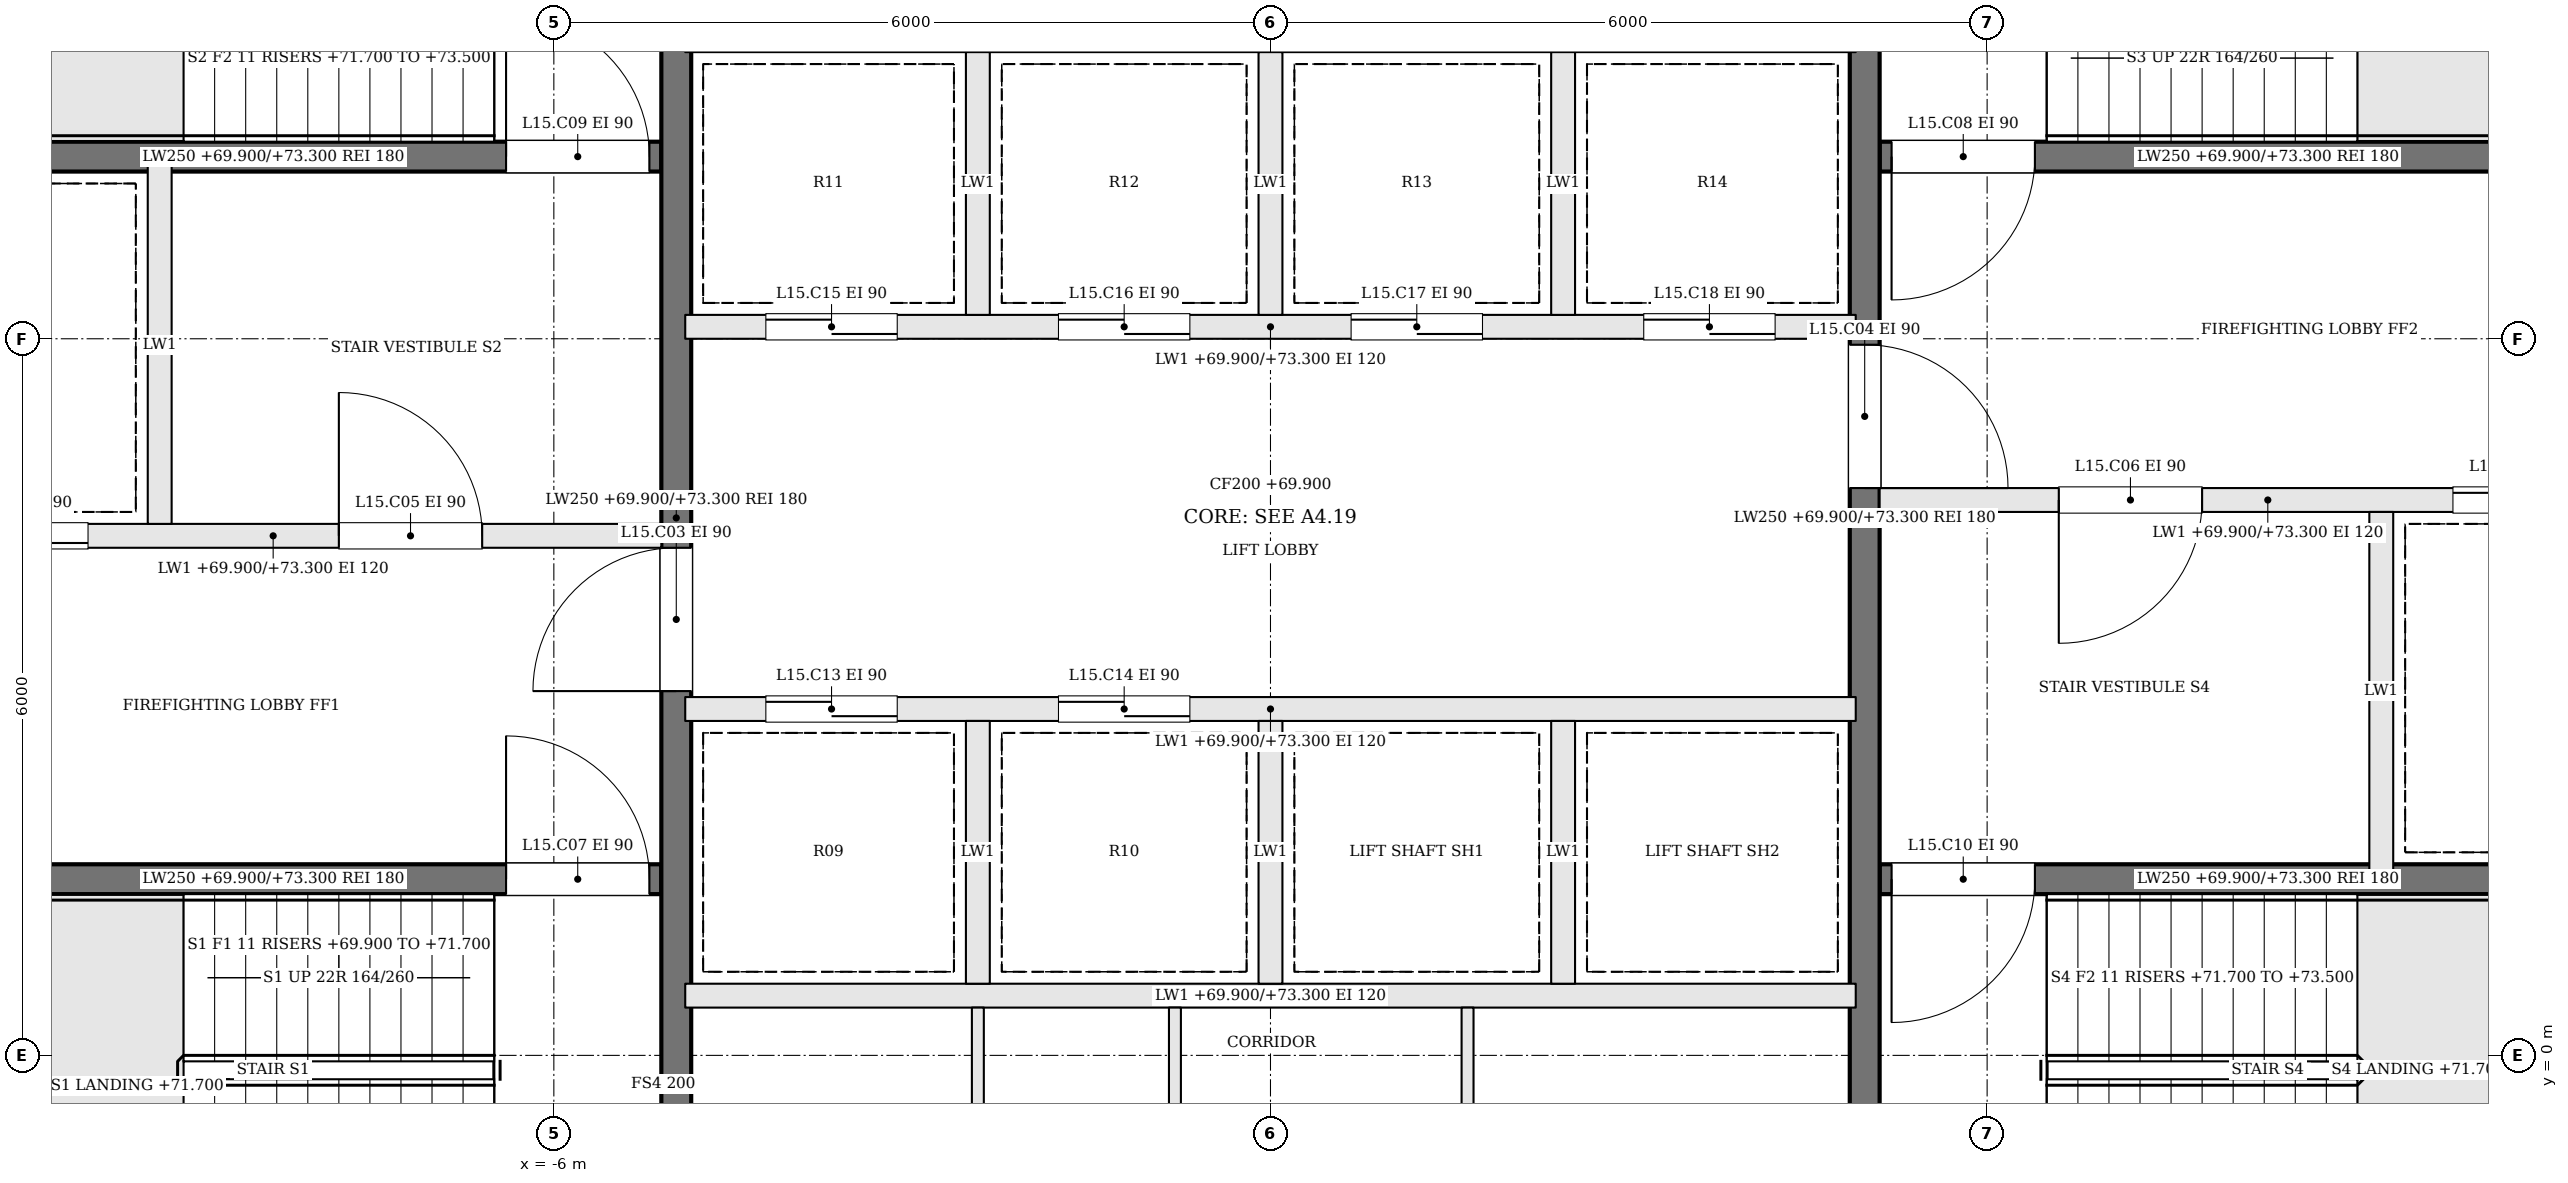
"""IFC4 building model, lengths in metres.
Left out: names, types, materials, properties, quantities, classifications, styles, units other than length and angle.
Written with IfcOpenShell. Run it as: python <this file> out.ifc"""

import sys

from ifc_helpers import new_model, si_unit, direction, frame, frame_2d, origin, place, context, subcontext, project, spatial, rectangle, extrude, element, fill, save


model = new_model("IFC4")
c1 = context("Model", 3, precision=1e-05, world=origin(), true_north=direction((0.0, 1.0)))
c2 = subcontext(c1, "Body", "Model", "MODEL_VIEW")
j1 = project(units=[si_unit("LENGTHUNIT", "METRE"), si_unit("PLANEANGLEUNIT", "RADIAN")], contexts=[c1])
p1 = place(None, origin())
s1 = spatial("IfcSite", under=j1, at=p1, CompositionType="ELEMENT")
p2 = place(p1, origin())
s2 = spatial("IfcBuilding", under=s1, at=p2, CompositionType="ELEMENT")
p3 = place(p2, frame((0.0, 0.0, 69.9)))
s3 = spatial("IfcBuildingStorey", under=s2, at=p3, CompositionType="ELEMENT", Elevation=69.9)
p4 = place(p3, frame((-11.6, 1.475, 0.0), z_axis=(0.0, 0.0, 1.0), x_axis=(1.0, 0.0, 0.0)))
e1 = element("IfcWall", 1, at=p4, inside=s3, PredefinedType="SOLIDWALL", context=c2, shape_type="SweptSolid", body=[
    extrude(rectangle(XDim=6.5, YDim=0.25, at=frame_2d((3.25, 0.0))), origin(), (0.0, 0.0, 1.0), 3.4),
])
p5 = place(p4, frame((5.2, 0.0, 0.0)))
e2 = element("IfcOpeningElement", 2, at=p5, cuts=e1, PredefinedType="OPENING", context=c2, shape_type="SweptSolid", body=[
    extrude(rectangle(XDim=1.2, YDim=2.1, at=frame_2d((0.6, 1.05))), frame((0.0, 0.135, 0.0), z_axis=(0.0, -1.0, 0.0), x_axis=(1.0, 0.0, 0.0)), (0.0, 0.0, 1.0), 0.27),
])
p6 = place(p3, frame((11.6, 7.525, 0.0), z_axis=(0.0, 0.0, 1.0), x_axis=(-1.0, 0.0, 0.0)))
e3 = element("IfcWall", 3, at=p6, inside=s3, PredefinedType="SOLIDWALL", context=c2, shape_type="SweptSolid", body=[
    extrude(rectangle(XDim=6.5, YDim=0.25, at=frame_2d((3.25, 0.0))), origin(), (0.0, 0.0, 1.0), 3.4),
])
p7 = place(p6, frame((5.2, 0.0, 0.0)))
e4 = element("IfcOpeningElement", 4, at=p7, cuts=e3, PredefinedType="OPENING", context=c2, shape_type="SweptSolid", body=[
    extrude(rectangle(XDim=1.2, YDim=2.1, at=frame_2d((0.6, 1.05))), frame((0.0, 0.135, 0.0), z_axis=(0.0, -1.0, 0.0), x_axis=(1.0, 0.0, 0.0)), (0.0, 0.0, 1.0), 0.27),
])
p8 = place(p3, frame((-11.6, 4.35, 0.0), z_axis=(0.0, 0.0, 1.0), x_axis=(1.0, 0.0, 0.0)))
e5 = element("IfcWall", 5, at=p8, inside=s3, PredefinedType="SOLIDWALL", context=c2, shape_type="SweptSolid", body=[
    extrude(rectangle(XDim=6.5, YDim=0.2, at=frame_2d((3.25, 0.0))), origin(), (0.0, 0.0, 1.0), 3.4),
])
p9 = place(p8, frame((3.8, 0.0, 0.0)))
e6 = element("IfcOpeningElement", 6, at=p9, cuts=e5, PredefinedType="OPENING", context=c2, shape_type="SweptSolid", body=[
    extrude(rectangle(XDim=1.2, YDim=2.1, at=frame_2d((0.6, 1.05))), frame((0.0, 0.11, 0.0), z_axis=(0.0, -1.0, 0.0), x_axis=(1.0, 0.0, 0.0)), (0.0, 0.0, 1.0), 0.22),
])
p10 = place(p8, frame((0.5, 0.0, 0.0)))
e7 = element("IfcOpeningElement", 7, at=p10, cuts=e5, PredefinedType="OPENING", context=c2, shape_type="SweptSolid", body=[
    extrude(rectangle(XDim=1.2, YDim=2.1, at=frame_2d((0.6, 1.05))), frame((0.0, 0.11, 0.0), z_axis=(0.0, -1.0, 0.0), x_axis=(1.0, 0.0, 0.0)), (0.0, 0.0, 1.0), 0.22),
])
p11 = place(p3, frame((11.6, 4.65, 0.0), z_axis=(0.0, 0.0, 1.0), x_axis=(-1.0, 0.0, 0.0)))
e8 = element("IfcWall", 8, at=p11, inside=s3, PredefinedType="SOLIDWALL", context=c2, shape_type="SweptSolid", body=[
    extrude(rectangle(XDim=6.5, YDim=0.2, at=frame_2d((3.25, 0.0))), origin(), (0.0, 0.0, 1.0), 3.4),
])
p12 = place(p11, frame((3.8, 0.0, 0.0)))
e9 = element("IfcOpeningElement", 9, at=p12, cuts=e8, PredefinedType="OPENING", context=c2, shape_type="SweptSolid", body=[
    extrude(rectangle(XDim=1.2, YDim=2.1, at=frame_2d((0.6, 1.05))), frame((0.0, 0.11, 0.0), z_axis=(0.0, -1.0, 0.0), x_axis=(1.0, 0.0, 0.0)), (0.0, 0.0, 1.0), 0.22),
])
p13 = place(p11, frame((0.5, 0.0, 0.0)))
e10 = element("IfcOpeningElement", 10, at=p13, cuts=e8, PredefinedType="OPENING", context=c2, shape_type="SweptSolid", body=[
    extrude(rectangle(XDim=1.2, YDim=2.1, at=frame_2d((0.6, 1.05))), frame((0.0, 0.11, 0.0), z_axis=(0.0, -1.0, 0.0), x_axis=(1.0, 0.0, 0.0)), (0.0, 0.0, 1.0), 0.22),
])
p14 = place(p3, frame((-11.6, 7.525, 0.0), z_axis=(0.0, 0.0, 1.0), x_axis=(1.0, 0.0, 0.0)))
e11 = element("IfcWall", 11, at=p14, inside=s3, PredefinedType="SOLIDWALL", context=c2, shape_type="SweptSolid", body=[
    extrude(rectangle(XDim=6.5, YDim=0.25, at=frame_2d((3.25, 0.0))), origin(), (0.0, 0.0, 1.0), 3.4),
])
p15 = place(p14, frame((5.2, 0.0, 0.0)))
e12 = element("IfcOpeningElement", 12, at=p15, cuts=e11, PredefinedType="OPENING", context=c2, shape_type="SweptSolid", body=[
    extrude(rectangle(XDim=1.2, YDim=2.1, at=frame_2d((0.6, 1.05))), frame((0.0, 0.135, 0.0), z_axis=(0.0, -1.0, 0.0), x_axis=(1.0, 0.0, 0.0)), (0.0, 0.0, 1.0), 0.27),
])
p16 = place(p3, frame((11.6, 1.475, 0.0), z_axis=(0.0, 0.0, 1.0), x_axis=(-1.0, 0.0, 0.0)))
e13 = element("IfcWall", 13, at=p16, inside=s3, PredefinedType="SOLIDWALL", context=c2, shape_type="SweptSolid", body=[
    extrude(rectangle(XDim=6.5, YDim=0.25, at=frame_2d((3.25, 0.0))), origin(), (0.0, 0.0, 1.0), 3.4),
])
p17 = place(p16, frame((5.2, 0.0, 0.0)))
e14 = element("IfcOpeningElement", 14, at=p17, cuts=e13, PredefinedType="OPENING", context=c2, shape_type="SweptSolid", body=[
    extrude(rectangle(XDim=1.2, YDim=2.1, at=frame_2d((0.6, 1.05))), frame((0.0, 0.135, 0.0), z_axis=(0.0, -1.0, 0.0), x_axis=(1.0, 0.0, 0.0)), (0.0, 0.0, 1.0), 0.27),
])
for number, where, z_axis, x_axis in (
    (15, (-9.3, 4.45, 0.0), (0.0, 0.0, 1.0), (0.0, 1.0, 0.0)),
    (16, (9.3, 4.55, 0.0), (0.0, 0.0, 1.0), (0.0, -1.0, 0.0)),
):
    element("IfcWall", number, at=place(p3, frame(where, z_axis=z_axis, x_axis=x_axis)), inside=s3, PredefinedType="SOLIDWALL", context=c2, shape_type="SweptSolid", body=[
        extrude(rectangle(XDim=3.0, YDim=0.2, at=frame_2d((1.5, 0.0))), origin(), (0.0, 0.0, 1.0), 3.4),
    ])
p18 = place(p3, frame((-4.975, -1.6, 0.0), z_axis=(0.0, 0.0, 1.0), x_axis=(0.0, 1.0, 0.0)))
e17 = element("IfcWall", 17, at=p18, inside=s3, PredefinedType="SOLIDWALL", context=c2, shape_type="SweptSolid", body=[
    extrude(rectangle(XDim=12.2, YDim=0.25, at=frame_2d((6.1, 0.0))), origin(), (0.0, 0.0, 1.0), 3.4),
])
p19 = place(p18, frame((4.65, 0.0, 0.0)))
e18 = element("IfcOpeningElement", 18, at=p19, cuts=e17, PredefinedType="OPENING", context=c2, shape_type="SweptSolid", body=[
    extrude(rectangle(XDim=1.2, YDim=2.1, at=frame_2d((0.6, 1.05))), frame((0.0, 0.135, 0.0), z_axis=(0.0, -1.0, 0.0), x_axis=(1.0, 0.0, 0.0)), (0.0, 0.0, 1.0), 0.27),
])
p20 = place(p3, frame((4.975, 10.6, 0.0), z_axis=(0.0, 0.0, 1.0), x_axis=(0.0, -1.0, 0.0)))
e19 = element("IfcWall", 19, at=p20, inside=s3, PredefinedType="SOLIDWALL", context=c2, shape_type="SweptSolid", body=[
    extrude(rectangle(XDim=12.2, YDim=0.25, at=frame_2d((6.1, 0.0))), origin(), (0.0, 0.0, 1.0), 3.4),
])
p21 = place(p20, frame((4.65, 0.0, 0.0)))
e20 = element("IfcOpeningElement", 20, at=p21, cuts=e19, PredefinedType="OPENING", context=c2, shape_type="SweptSolid", body=[
    extrude(rectangle(XDim=1.2, YDim=2.1, at=frame_2d((0.6, 1.05))), frame((0.0, 0.135, 0.0), z_axis=(0.0, -1.0, 0.0), x_axis=(1.0, 0.0, 0.0)), (0.0, 0.0, 1.0), 0.27),
])
p22 = place(p3, frame((-4.9, 0.5, 0.0), z_axis=(0.0, 0.0, 1.0), x_axis=(1.0, 0.0, 0.0)))
e21 = element("IfcWall", 21, at=p22, inside=s3, PredefinedType="SOLIDWALL", context=c2, shape_type="SweptSolid", body=[
    extrude(rectangle(XDim=9.8, YDim=0.2, at=frame_2d((4.9, 0.0))), origin(), (0.0, 0.0, 1.0), 3.4),
])
p23 = place(p3, frame((-4.9, 2.9, 0.0), z_axis=(0.0, 0.0, 1.0), x_axis=(1.0, 0.0, 0.0)))
e22 = element("IfcWall", 22, at=p23, inside=s3, PredefinedType="SOLIDWALL", context=c2, shape_type="SweptSolid", body=[
    extrude(rectangle(XDim=9.8, YDim=0.2, at=frame_2d((4.9, 0.0))), origin(), (0.0, 0.0, 1.0), 3.4),
])
p24 = place(p23, frame((0.675, 0.0, 0.0)))
e23 = element("IfcOpeningElement", 23, at=p24, cuts=e22, PredefinedType="OPENING", context=c2, shape_type="SweptSolid", body=[
    extrude(rectangle(XDim=1.1, YDim=2.1, at=frame_2d((0.55, 1.05))), frame((0.0, 0.11, 0.0), z_axis=(0.0, -1.0, 0.0), x_axis=(1.0, 0.0, 0.0)), (0.0, 0.0, 1.0), 0.22),
])
p25 = place(p23, frame((3.125, 0.0, 0.0)))
e24 = element("IfcOpeningElement", 24, at=p25, cuts=e22, PredefinedType="OPENING", context=c2, shape_type="SweptSolid", body=[
    extrude(rectangle(XDim=1.1, YDim=2.1, at=frame_2d((0.55, 1.05))), frame((0.0, 0.11, 0.0), z_axis=(0.0, -1.0, 0.0), x_axis=(1.0, 0.0, 0.0)), (0.0, 0.0, 1.0), 0.22),
])
p26 = place(p3, frame((-4.9, 6.1, 0.0), z_axis=(0.0, 0.0, 1.0), x_axis=(1.0, 0.0, 0.0)))
e25 = element("IfcWall", 25, at=p26, inside=s3, PredefinedType="SOLIDWALL", context=c2, shape_type="SweptSolid", body=[
    extrude(rectangle(XDim=9.8, YDim=0.2, at=frame_2d((4.9, 0.0))), origin(), (0.0, 0.0, 1.0), 3.4),
])
p27 = place(p26, frame((0.675, 0.0, 0.0)))
e26 = element("IfcOpeningElement", 26, at=p27, cuts=e25, PredefinedType="OPENING", context=c2, shape_type="SweptSolid", body=[
    extrude(rectangle(XDim=1.1, YDim=2.1, at=frame_2d((0.55, 1.05))), frame((0.0, 0.11, 0.0), z_axis=(0.0, -1.0, 0.0), x_axis=(1.0, 0.0, 0.0)), (0.0, 0.0, 1.0), 0.22),
])
p28 = place(p26, frame((3.125, 0.0, 0.0)))
e27 = element("IfcOpeningElement", 27, at=p28, cuts=e25, PredefinedType="OPENING", context=c2, shape_type="SweptSolid", body=[
    extrude(rectangle(XDim=1.1, YDim=2.1, at=frame_2d((0.55, 1.05))), frame((0.0, 0.11, 0.0), z_axis=(0.0, -1.0, 0.0), x_axis=(1.0, 0.0, 0.0)), (0.0, 0.0, 1.0), 0.22),
])
p29 = place(p26, frame((5.575, 0.0, 0.0)))
e28 = element("IfcOpeningElement", 28, at=p29, cuts=e25, PredefinedType="OPENING", context=c2, shape_type="SweptSolid", body=[
    extrude(rectangle(XDim=1.1, YDim=2.1, at=frame_2d((0.55, 1.05))), frame((0.0, 0.11, 0.0), z_axis=(0.0, -1.0, 0.0), x_axis=(1.0, 0.0, 0.0)), (0.0, 0.0, 1.0), 0.22),
])
p30 = place(p26, frame((8.025, 0.0, 0.0)))
e29 = element("IfcOpeningElement", 29, at=p30, cuts=e25, PredefinedType="OPENING", context=c2, shape_type="SweptSolid", body=[
    extrude(rectangle(XDim=1.1, YDim=2.1, at=frame_2d((0.55, 1.05))), frame((0.0, 0.11, 0.0), z_axis=(0.0, -1.0, 0.0), x_axis=(1.0, 0.0, 0.0)), (0.0, 0.0, 1.0), 0.22),
])
for number, where, z_axis, x_axis in (
    (30, (-2.45, 0.6, 0.0), (0.0, 0.0, 1.0), (0.0, 1.0, 0.0)),
    (31, (0.0, 0.6, 0.0), (0.0, 0.0, 1.0), (0.0, 1.0, 0.0)),
    (32, (2.45, 0.6, 0.0), (0.0, 0.0, 1.0), (0.0, 1.0, 0.0)),
    (33, (-2.45, 6.2, 0.0), (0.0, 0.0, 1.0), (0.0, 1.0, 0.0)),
    (34, (0.0, 6.2, 0.0), (0.0, 0.0, 1.0), (0.0, 1.0, 0.0)),
    (35, (2.45, 6.2, 0.0), (0.0, 0.0, 1.0), (0.0, 1.0, 0.0)),
):
    element("IfcWall", number, at=place(p3, frame(where, z_axis=z_axis, x_axis=x_axis)), inside=s3, PredefinedType="SOLIDWALL", context=c2, shape_type="SweptSolid", body=[
        extrude(rectangle(XDim=2.2, YDim=0.2, at=frame_2d((1.1, 0.0))), origin(), (0.0, 0.0, 1.0), 3.4),
    ])
for number, where, z_axis, x_axis in (
    (36, (-2.45, -1.6, 0.0), (0.0, 0.0, 1.0), (0.0, 1.0, 0.0)),
    (37, (-0.8, -1.6, 0.0), (0.0, 0.0, 1.0), (0.0, 1.0, 0.0)),
    (38, (1.65, -1.6, 0.0), (0.0, 0.0, 1.0), (0.0, 1.0, 0.0)),
):
    element("IfcWall", number, at=place(p3, frame(where, z_axis=z_axis, x_axis=x_axis)), inside=s3, PredefinedType="PARTITIONING", context=c2, shape_type="SweptSolid", body=[
        extrude(rectangle(XDim=2.0, YDim=0.1, at=frame_2d((1.0, 0.0))), origin(), (0.0, 0.0, 1.0), 3.4),
    ])
p31 = place(p19, origin())
e39 = element("IfcDoor", 39, at=p31, inside=s3, OperationType="SINGLE_SWING_LEFT", PredefinedType="DOOR", context=c2, shape_type="SweptSolid", body=[
    extrude(rectangle(XDim=1.2, YDim=2.1, at=frame_2d((0.6, 1.05))), frame((0.0, 0.025, 0.0), z_axis=(0.0, -1.0, 0.0), x_axis=(1.0, 0.0, 0.0)), (0.0, 0.0, 1.0), 0.05),
])
fill(e18, e39)
p32 = place(p21, origin())
e40 = element("IfcDoor", 40, at=p32, inside=s3, OperationType="SINGLE_SWING_RIGHT", PredefinedType="DOOR", context=c2, shape_type="SweptSolid", body=[
    extrude(rectangle(XDim=1.2, YDim=2.1, at=frame_2d((0.6, 1.05))), frame((0.0, 0.025, 0.0), z_axis=(0.0, -1.0, 0.0), x_axis=(1.0, 0.0, 0.0)), (0.0, 0.0, 1.0), 0.05),
])
fill(e20, e40)
p33 = place(p9, origin())
e41 = element("IfcDoor", 41, at=p33, inside=s3, OperationType="SINGLE_SWING_LEFT", PredefinedType="DOOR", context=c2, shape_type="SweptSolid", body=[
    extrude(rectangle(XDim=1.2, YDim=2.1, at=frame_2d((0.6, 1.05))), frame((0.0, 0.025, 0.0), z_axis=(0.0, -1.0, 0.0), x_axis=(1.0, 0.0, 0.0)), (0.0, 0.0, 1.0), 0.05),
])
fill(e6, e41)
p34 = place(p12, origin())
e42 = element("IfcDoor", 42, at=p34, inside=s3, OperationType="SINGLE_SWING_RIGHT", PredefinedType="DOOR", context=c2, shape_type="SweptSolid", body=[
    extrude(rectangle(XDim=1.2, YDim=2.1, at=frame_2d((0.6, 1.05))), frame((0.0, 0.025, 0.0), z_axis=(0.0, -1.0, 0.0), x_axis=(1.0, 0.0, 0.0)), (0.0, 0.0, 1.0), 0.05),
])
fill(e9, e42)
p35 = place(p5, origin())
e43 = element("IfcDoor", 43, at=p35, inside=s3, OperationType="SINGLE_SWING_LEFT", PredefinedType="DOOR", context=c2, shape_type="SweptSolid", body=[
    extrude(rectangle(XDim=1.2, YDim=2.1, at=frame_2d((0.6, 1.05))), frame((0.0, 0.025, 0.0), z_axis=(0.0, -1.0, 0.0), x_axis=(1.0, 0.0, 0.0)), (0.0, 0.0, 1.0), 0.05),
])
fill(e2, e43)
p36 = place(p7, origin())
e44 = element("IfcDoor", 44, at=p36, inside=s3, OperationType="SINGLE_SWING_RIGHT", PredefinedType="DOOR", context=c2, shape_type="SweptSolid", body=[
    extrude(rectangle(XDim=1.2, YDim=2.1, at=frame_2d((0.6, 1.05))), frame((0.0, 0.025, 0.0), z_axis=(0.0, -1.0, 0.0), x_axis=(1.0, 0.0, 0.0)), (0.0, 0.0, 1.0), 0.05),
])
fill(e4, e44)
p37 = place(p15, origin())
e45 = element("IfcDoor", 45, at=p37, inside=s3, OperationType="SINGLE_SWING_LEFT", PredefinedType="DOOR", context=c2, shape_type="SweptSolid", body=[
    extrude(rectangle(XDim=1.2, YDim=2.1, at=frame_2d((0.6, 1.05))), frame((0.0, 0.025, 0.0), z_axis=(0.0, -1.0, 0.0), x_axis=(1.0, 0.0, 0.0)), (0.0, 0.0, 1.0), 0.05),
])
fill(e12, e45)
p38 = place(p17, origin())
e46 = element("IfcDoor", 46, at=p38, inside=s3, OperationType="SINGLE_SWING_RIGHT", PredefinedType="DOOR", context=c2, shape_type="SweptSolid", body=[
    extrude(rectangle(XDim=1.2, YDim=2.1, at=frame_2d((0.6, 1.05))), frame((0.0, 0.025, 0.0), z_axis=(0.0, -1.0, 0.0), x_axis=(1.0, 0.0, 0.0)), (0.0, 0.0, 1.0), 0.05),
])
fill(e14, e46)
p39 = place(p10, origin())
e47 = element("IfcDoor", 47, at=p39, inside=s3, OperationType="SLIDING_TO_RIGHT", PredefinedType="DOOR", context=c2, shape_type="SweptSolid", body=[
    extrude(rectangle(XDim=1.2, YDim=2.1, at=frame_2d((0.6, 1.05))), frame((0.0, 0.025, 0.0), z_axis=(0.0, -1.0, 0.0), x_axis=(1.0, 0.0, 0.0)), (0.0, 0.0, 1.0), 0.05),
])
fill(e7, e47)
p40 = place(p13, origin())
e48 = element("IfcDoor", 48, at=p40, inside=s3, OperationType="SLIDING_TO_RIGHT", PredefinedType="DOOR", context=c2, shape_type="SweptSolid", body=[
    extrude(rectangle(XDim=1.2, YDim=2.1, at=frame_2d((0.6, 1.05))), frame((0.0, 0.025, 0.0), z_axis=(0.0, -1.0, 0.0), x_axis=(1.0, 0.0, 0.0)), (0.0, 0.0, 1.0), 0.05),
])
fill(e10, e48)
p41 = place(p24, origin())
e49 = element("IfcDoor", 49, at=p41, inside=s3, OperationType="SLIDING_TO_RIGHT", PredefinedType="DOOR", context=c2, shape_type="SweptSolid", body=[
    extrude(rectangle(XDim=1.1, YDim=2.1, at=frame_2d((0.55, 1.05))), frame((0.0, 0.025, 0.0), z_axis=(0.0, -1.0, 0.0), x_axis=(1.0, 0.0, 0.0)), (0.0, 0.0, 1.0), 0.05),
])
fill(e23, e49)
p42 = place(p25, origin())
e50 = element("IfcDoor", 50, at=p42, inside=s3, OperationType="SLIDING_TO_LEFT", PredefinedType="DOOR", context=c2, shape_type="SweptSolid", body=[
    extrude(rectangle(XDim=1.1, YDim=2.1, at=frame_2d((0.55, 1.05))), frame((0.0, 0.025, 0.0), z_axis=(0.0, -1.0, 0.0), x_axis=(1.0, 0.0, 0.0)), (0.0, 0.0, 1.0), 0.05),
])
fill(e24, e50)
p43 = place(p27, origin())
e51 = element("IfcDoor", 51, at=p43, inside=s3, OperationType="SLIDING_TO_RIGHT", PredefinedType="DOOR", context=c2, shape_type="SweptSolid", body=[
    extrude(rectangle(XDim=1.1, YDim=2.1, at=frame_2d((0.55, 1.05))), frame((0.0, 0.025, 0.0), z_axis=(0.0, -1.0, 0.0), x_axis=(1.0, 0.0, 0.0)), (0.0, 0.0, 1.0), 0.05),
])
fill(e26, e51)
p44 = place(p28, origin())
e52 = element("IfcDoor", 52, at=p44, inside=s3, OperationType="SLIDING_TO_LEFT", PredefinedType="DOOR", context=c2, shape_type="SweptSolid", body=[
    extrude(rectangle(XDim=1.1, YDim=2.1, at=frame_2d((0.55, 1.05))), frame((0.0, 0.025, 0.0), z_axis=(0.0, -1.0, 0.0), x_axis=(1.0, 0.0, 0.0)), (0.0, 0.0, 1.0), 0.05),
])
fill(e27, e52)
p45 = place(p29, origin())
e53 = element("IfcDoor", 53, at=p45, inside=s3, OperationType="SLIDING_TO_RIGHT", PredefinedType="DOOR", context=c2, shape_type="SweptSolid", body=[
    extrude(rectangle(XDim=1.1, YDim=2.1, at=frame_2d((0.55, 1.05))), frame((0.0, 0.025, 0.0), z_axis=(0.0, -1.0, 0.0), x_axis=(1.0, 0.0, 0.0)), (0.0, 0.0, 1.0), 0.05),
])
fill(e28, e53)
p46 = place(p30, origin())
e54 = element("IfcDoor", 54, at=p46, inside=s3, OperationType="SLIDING_TO_LEFT", PredefinedType="DOOR", context=c2, shape_type="SweptSolid", body=[
    extrude(rectangle(XDim=1.1, YDim=2.1, at=frame_2d((0.55, 1.05))), frame((0.0, 0.025, 0.0), z_axis=(0.0, -1.0, 0.0), x_axis=(1.0, 0.0, 0.0)), (0.0, 0.0, 1.0), 0.05),
])
fill(e29, e54)
save(model, sys.argv[1])
